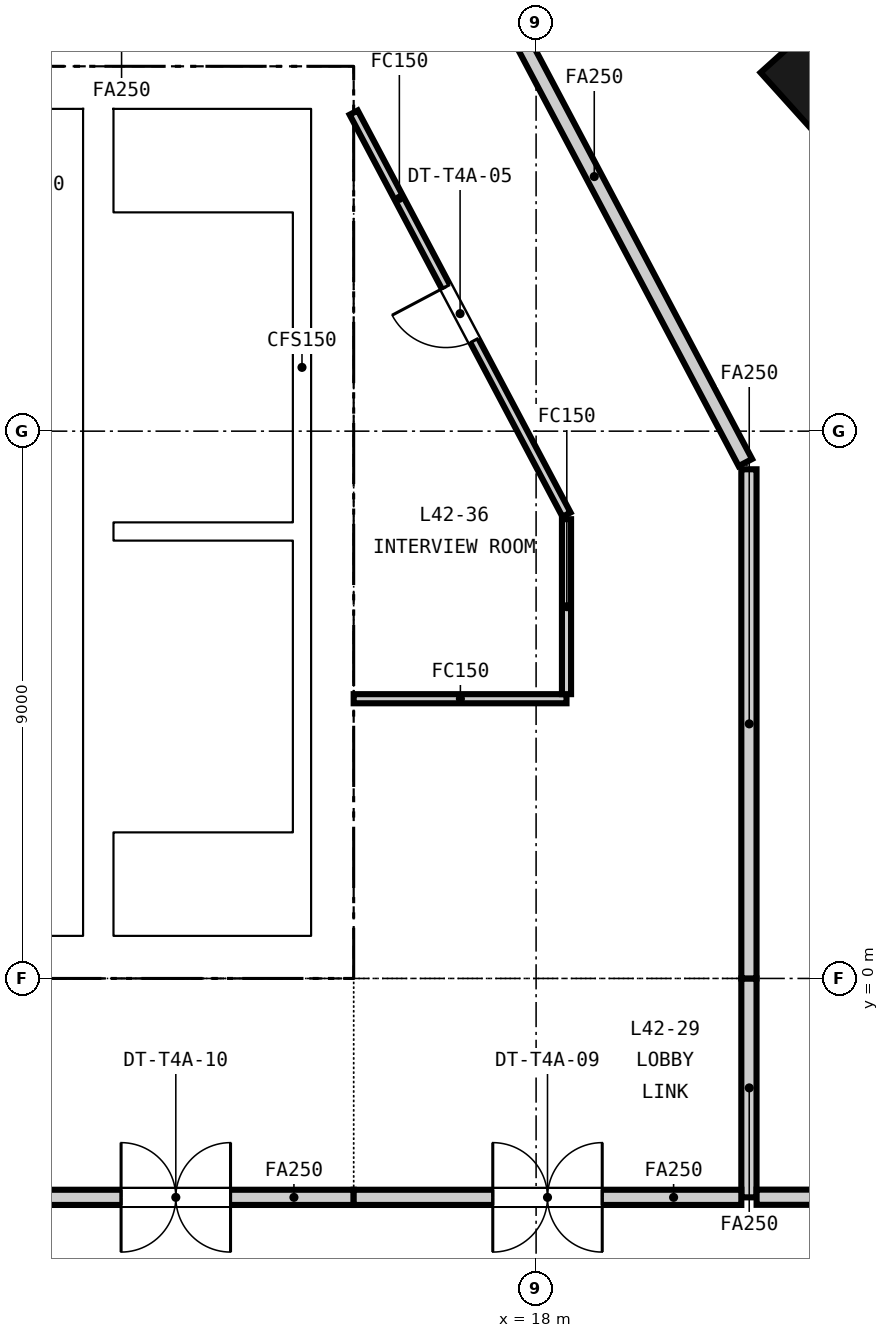
"""IFC4 building model, lengths in metres.
Left out: names, types, materials, properties, quantities, classifications, styles, units other than length and angle.
Written with IfcOpenShell. Run it as: python <this file> out.ifc"""

import sys

from ifc_helpers import new_model, si_unit, direction, frame, frame_2d, origin, origin_2d, place, context, subcontext, project, spatial, rectangle, extrude, element, fill, save


model = new_model("IFC4")
c1 = context("Model", 3, precision=1e-05, world=origin(), true_north=direction((0.0, 1.0)))
c2 = subcontext(c1, "Body", "Model", "MODEL_VIEW")
j1 = project(units=[si_unit("LENGTHUNIT", "METRE"), si_unit("PLANEANGLEUNIT", "RADIAN")], contexts=[c1])
p1 = place(None, origin())
s1 = spatial("IfcSite", under=j1, at=p1, CompositionType="ELEMENT")
p2 = place(p1, origin())
s2 = spatial("IfcBuilding", under=s1, at=p2, CompositionType="ELEMENT")
p3 = place(p2, frame((0.0, 0.0, 170.8)))
s3 = spatial("IfcBuildingStorey", under=s2, at=p3, CompositionType="ELEMENT", Elevation=170.8)
p4 = place(p3, frame((-15.0, 0.35, -0.15), z_axis=(0.0, 0.0, 1.0), x_axis=(1.0, 0.0, 0.0)))
e1 = element("IfcWall", 1, at=p4, inside=s3, PredefinedType="SOLIDWALL", context=c2, shape_type="SweptSolid", body=[
    extrude(rectangle(XDim=30.0, YDim=0.7, at=frame_2d((15.0, 0.0))), origin(), (0.0, 0.0, 1.0), 3.65),
])
p5 = place(p4, frame((5.8, 0.0, 0.15)))
e2 = element("IfcOpeningElement", 2, at=p5, cuts=e1, PredefinedType="OPENING", context=c2, shape_type="SweptSolid", body=[
    extrude(rectangle(XDim=2.4, YDim=2.4, at=frame_2d((1.2, 1.2))), frame((0.0, 0.36, 0.0), z_axis=(0.0, -1.0, 0.0), x_axis=(1.0, 0.0, 0.0)), (0.0, 0.0, 1.0), 0.72),
])
p6 = place(p4, frame((13.8, 0.0, 0.15)))
e3 = element("IfcOpeningElement", 3, at=p6, cuts=e1, PredefinedType="OPENING", context=c2, shape_type="SweptSolid", body=[
    extrude(rectangle(XDim=2.4, YDim=2.4, at=frame_2d((1.2, 1.2))), frame((0.0, 0.36, 0.0), z_axis=(0.0, -1.0, 0.0), x_axis=(1.0, 0.0, 0.0)), (0.0, 0.0, 1.0), 0.72),
])
p7 = place(p4, frame((21.8, 0.0, 0.15)))
e4 = element("IfcOpeningElement", 4, at=p7, cuts=e1, PredefinedType="OPENING", context=c2, shape_type="SweptSolid", body=[
    extrude(rectangle(XDim=2.4, YDim=2.4, at=frame_2d((1.2, 1.2))), frame((0.0, 0.36, 0.0), z_axis=(0.0, -1.0, 0.0), x_axis=(1.0, 0.0, 0.0)), (0.0, 0.0, 1.0), 0.72),
])
p8 = place(p4, frame((1.5, 0.0, 0.15)))
e5 = element("IfcOpeningElement", 5, at=p8, cuts=e1, PredefinedType="OPENING", context=c2, shape_type="SweptSolid", body=[
    extrude(rectangle(XDim=1.2, YDim=2.1, at=frame_2d((0.6, 1.05))), frame((0.0, 0.36, 0.0), z_axis=(0.0, -1.0, 0.0), x_axis=(1.0, 0.0, 0.0)), (0.0, 0.0, 1.0), 0.72),
])
p9 = place(p4, frame((27.3, 0.0, 0.15)))
e6 = element("IfcOpeningElement", 6, at=p9, cuts=e1, PredefinedType="OPENING", context=c2, shape_type="SweptSolid", body=[
    extrude(rectangle(XDim=1.2, YDim=2.1, at=frame_2d((0.6, 1.05))), frame((0.0, 0.36, 0.0), z_axis=(0.0, -1.0, 0.0), x_axis=(1.0, 0.0, 0.0)), (0.0, 0.0, 1.0), 0.72),
])
p10 = place(p3, frame((-15.0, 14.65, -0.15), z_axis=(0.0, 0.0, 1.0), x_axis=(1.0, 0.0, 0.0)))
e7 = element("IfcWall", 7, at=p10, inside=s3, PredefinedType="SOLIDWALL", context=c2, shape_type="SweptSolid", body=[
    extrude(rectangle(XDim=30.0, YDim=0.7, at=frame_2d((15.0, 0.0))), origin(), (0.0, 0.0, 1.0), 3.65),
])
p11 = place(p10, frame((9.25, 0.0, 0.15)))
e8 = element("IfcOpeningElement", 8, at=p11, cuts=e7, PredefinedType="OPENING", context=c2, shape_type="SweptSolid", body=[
    extrude(rectangle(XDim=1.5, YDim=2.1, at=frame_2d((0.75, 1.05))), frame((0.0, 0.36, 0.0), z_axis=(0.0, -1.0, 0.0), x_axis=(1.0, 0.0, 0.0)), (0.0, 0.0, 1.0), 0.72),
])
p12 = place(p10, frame((19.4, 0.0, 0.15)))
e9 = element("IfcOpeningElement", 9, at=p12, cuts=e7, PredefinedType="OPENING", context=c2, shape_type="SweptSolid", body=[
    extrude(rectangle(XDim=1.5, YDim=2.1, at=frame_2d((0.75, 1.05))), frame((0.0, 0.36, 0.0), z_axis=(0.0, -1.0, 0.0), x_axis=(1.0, 0.0, 0.0)), (0.0, 0.0, 1.0), 0.72),
])
p13 = place(p10, frame((1.5, 0.0, 0.15)))
e10 = element("IfcOpeningElement", 10, at=p13, cuts=e7, PredefinedType="OPENING", context=c2, shape_type="SweptSolid", body=[
    extrude(rectangle(XDim=1.2, YDim=2.1, at=frame_2d((0.6, 1.05))), frame((0.0, 0.36, 0.0), z_axis=(0.0, -1.0, 0.0), x_axis=(1.0, 0.0, 0.0)), (0.0, 0.0, 1.0), 0.72),
])
p14 = place(p10, frame((27.3, 0.0, 0.15)))
e11 = element("IfcOpeningElement", 11, at=p14, cuts=e7, PredefinedType="OPENING", context=c2, shape_type="SweptSolid", body=[
    extrude(rectangle(XDim=1.2, YDim=2.1, at=frame_2d((0.6, 1.05))), frame((0.0, 0.36, 0.0), z_axis=(0.0, -1.0, 0.0), x_axis=(1.0, 0.0, 0.0)), (0.0, 0.0, 1.0), 0.72),
])
p15 = place(p3, frame((14.65, 0.7, -0.15), z_axis=(0.0, 0.0, 1.0), x_axis=(0.0, 1.0, 0.0)))
e12 = element("IfcWall", 12, at=p15, inside=s3, PredefinedType="SOLIDWALL", context=c2, shape_type="SweptSolid", body=[
    extrude(rectangle(XDim=13.6, YDim=0.7, at=frame_2d((6.8, 0.0))), origin(), (0.0, 0.0, 1.0), 3.65),
])
p16 = place(p3, frame((10.8, 0.7, -0.15), z_axis=(0.0, 0.0, 1.0), x_axis=(0.0, 1.0, 0.0)))
e13 = element("IfcWall", 13, at=p16, inside=s3, PredefinedType="SOLIDWALL", context=c2, shape_type="SweptSolid", body=[
    extrude(rectangle(XDim=13.6, YDim=0.5, at=frame_2d((6.8, 0.0))), origin(), (0.0, 0.0, 1.0), 3.65),
])
p17 = place(p3, frame((22.61, 14.849, -0.15), z_axis=(0.0, 0.0, 1.0), x_axis=(-0.669130606359, 0.743144825477, 0.0)))
e14 = element("IfcColumn", 14, at=p17, inside=s3, PredefinedType="COLUMN", context=c2, shape_type="SweptSolid", body=[
    extrude(rectangle(XDim=1.3, YDim=1.3, at=origin_2d()), origin(), (0.0, 0.0, 1.0), 3.65),
])
p18 = place(p3, frame((-10.55, 3.5, 0.0), z_axis=(0.0, 0.0, 1.0), x_axis=(1.0, 0.0, 0.0)))
e15 = element("IfcWall", 15, at=p18, inside=s3, PredefinedType="PARTITIONING", context=c2, shape_type="SweptSolid", body=[
    extrude(rectangle(XDim=21.1, YDim=0.2, at=frame_2d((10.55, 0.0))), origin(), (0.0, 0.0, 1.0), 3.5),
])
p19 = place(p18, frame((1.262, 0.0, 0.0)))
e16 = element("IfcOpeningElement", 16, at=p19, cuts=e15, PredefinedType="OPENING", context=c2, shape_type="SweptSolid", body=[
    extrude(rectangle(XDim=1.0, YDim=2.1, at=frame_2d((0.5, 1.05))), frame((0.0, 0.11, 0.0), z_axis=(0.0, -1.0, 0.0), x_axis=(1.0, 0.0, 0.0)), (0.0, 0.0, 1.0), 0.22),
])
p20 = place(p18, frame((6.0, 0.0, 0.0)))
e17 = element("IfcOpeningElement", 17, at=p20, cuts=e15, PredefinedType="OPENING", context=c2, shape_type="SweptSolid", body=[
    extrude(rectangle(XDim=1.0, YDim=2.1, at=frame_2d((0.5, 1.05))), frame((0.0, 0.11, 0.0), z_axis=(0.0, -1.0, 0.0), x_axis=(1.0, 0.0, 0.0)), (0.0, 0.0, 1.0), 0.22),
])
p21 = place(p18, frame((11.1, 0.0, 0.0)))
e18 = element("IfcOpeningElement", 18, at=p21, cuts=e15, PredefinedType="OPENING", context=c2, shape_type="SweptSolid", body=[
    extrude(rectangle(XDim=1.0, YDim=2.1, at=frame_2d((0.5, 1.05))), frame((0.0, 0.11, 0.0), z_axis=(0.0, -1.0, 0.0), x_axis=(1.0, 0.0, 0.0)), (0.0, 0.0, 1.0), 0.22),
])
p22 = place(p18, frame((16.113, 0.0, 0.0)))
e19 = element("IfcOpeningElement", 19, at=p22, cuts=e15, PredefinedType="OPENING", context=c2, shape_type="SweptSolid", body=[
    extrude(rectangle(XDim=1.0, YDim=2.1, at=frame_2d((0.5, 1.05))), frame((0.0, 0.11, 0.0), z_axis=(0.0, -1.0, 0.0), x_axis=(1.0, 0.0, 0.0)), (0.0, 0.0, 1.0), 0.22),
])
p23 = place(p18, frame((19.9, 0.0, 0.0)))
e20 = element("IfcOpeningElement", 20, at=p23, cuts=e15, PredefinedType="OPENING", context=c2, shape_type="SweptSolid", body=[
    extrude(rectangle(XDim=0.9, YDim=2.1, at=frame_2d((0.45, 1.05))), frame((0.0, 0.11, 0.0), z_axis=(0.0, -1.0, 0.0), x_axis=(1.0, 0.0, 0.0)), (0.0, 0.0, 1.0), 0.22),
])
p24 = place(p3, frame((-10.55, 6.025, 0.0), z_axis=(0.0, 0.0, 1.0), x_axis=(1.0, 0.0, 0.0)))
e21 = element("IfcWall", 21, at=p24, inside=s3, PredefinedType="PARTITIONING", context=c2, shape_type="SweptSolid", body=[
    extrude(rectangle(XDim=21.1, YDim=0.25, at=frame_2d((10.55, 0.0))), origin(), (0.0, 0.0, 1.0), 3.5),
])
p25 = place(p3, frame((-10.55, 8.55, 0.0), z_axis=(0.0, 0.0, 1.0), x_axis=(1.0, 0.0, 0.0)))
e22 = element("IfcWall", 22, at=p25, inside=s3, PredefinedType="PARTITIONING", context=c2, shape_type="SweptSolid", body=[
    extrude(rectangle(XDim=21.1, YDim=0.2, at=frame_2d((10.55, 0.0))), origin(), (0.0, 0.0, 1.0), 3.5),
])
p26 = place(p25, frame((0.675, 0.0, 0.0)))
e23 = element("IfcOpeningElement", 23, at=p26, cuts=e22, PredefinedType="OPENING", context=c2, shape_type="SweptSolid", body=[
    extrude(rectangle(XDim=1.2, YDim=2.1, at=frame_2d((0.6, 1.05))), frame((0.0, 0.11, 0.0), z_axis=(0.0, -1.0, 0.0), x_axis=(1.0, 0.0, 0.0)), (0.0, 0.0, 1.0), 0.22),
])
p27 = place(p25, frame((3.475, 0.0, 0.0)))
e24 = element("IfcOpeningElement", 24, at=p27, cuts=e22, PredefinedType="OPENING", context=c2, shape_type="SweptSolid", body=[
    extrude(rectangle(XDim=1.2, YDim=2.1, at=frame_2d((0.6, 1.05))), frame((0.0, 0.11, 0.0), z_axis=(0.0, -1.0, 0.0), x_axis=(1.0, 0.0, 0.0)), (0.0, 0.0, 1.0), 0.22),
])
p28 = place(p25, frame((6.275, 0.0, 0.0)))
e25 = element("IfcOpeningElement", 25, at=p28, cuts=e22, PredefinedType="OPENING", context=c2, shape_type="SweptSolid", body=[
    extrude(rectangle(XDim=1.2, YDim=2.1, at=frame_2d((0.6, 1.05))), frame((0.0, 0.11, 0.0), z_axis=(0.0, -1.0, 0.0), x_axis=(1.0, 0.0, 0.0)), (0.0, 0.0, 1.0), 0.22),
])
p29 = place(p25, frame((9.075, 0.0, 0.0)))
e26 = element("IfcOpeningElement", 26, at=p29, cuts=e22, PredefinedType="OPENING", context=c2, shape_type="SweptSolid", body=[
    extrude(rectangle(XDim=1.2, YDim=2.1, at=frame_2d((0.6, 1.05))), frame((0.0, 0.11, 0.0), z_axis=(0.0, -1.0, 0.0), x_axis=(1.0, 0.0, 0.0)), (0.0, 0.0, 1.0), 0.22),
])
p30 = place(p25, frame((11.875, 0.0, 0.0)))
e27 = element("IfcOpeningElement", 27, at=p30, cuts=e22, PredefinedType="OPENING", context=c2, shape_type="SweptSolid", body=[
    extrude(rectangle(XDim=1.2, YDim=2.1, at=frame_2d((0.6, 1.05))), frame((0.0, 0.11, 0.0), z_axis=(0.0, -1.0, 0.0), x_axis=(1.0, 0.0, 0.0)), (0.0, 0.0, 1.0), 0.22),
])
p31 = place(p25, frame((14.675, 0.0, 0.0)))
e28 = element("IfcOpeningElement", 28, at=p31, cuts=e22, PredefinedType="OPENING", context=c2, shape_type="SweptSolid", body=[
    extrude(rectangle(XDim=1.2, YDim=2.1, at=frame_2d((0.6, 1.05))), frame((0.0, 0.11, 0.0), z_axis=(0.0, -1.0, 0.0), x_axis=(1.0, 0.0, 0.0)), (0.0, 0.0, 1.0), 0.22),
])
p32 = place(p25, frame((17.475, 0.0, 0.0)))
e29 = element("IfcOpeningElement", 29, at=p32, cuts=e22, PredefinedType="OPENING", context=c2, shape_type="SweptSolid", body=[
    extrude(rectangle(XDim=1.2, YDim=2.1, at=frame_2d((0.6, 1.05))), frame((0.0, 0.11, 0.0), z_axis=(0.0, -1.0, 0.0), x_axis=(1.0, 0.0, 0.0)), (0.0, 0.0, 1.0), 0.22),
])
p33 = place(p25, frame((19.9, 0.0, 0.0)))
e30 = element("IfcOpeningElement", 30, at=p33, cuts=e22, PredefinedType="OPENING", context=c2, shape_type="SweptSolid", body=[
    extrude(rectangle(XDim=0.9, YDim=2.1, at=frame_2d((0.45, 1.05))), frame((0.0, 0.11, 0.0), z_axis=(0.0, -1.0, 0.0), x_axis=(1.0, 0.0, 0.0)), (0.0, 0.0, 1.0), 0.22),
])
p34 = place(p3, frame((5.9, 11.2, 0.0), z_axis=(0.0, 0.0, 1.0), x_axis=(1.0, 0.0, 0.0)))
e31 = element("IfcWall", 31, at=p34, inside=s3, PredefinedType="PARTITIONING", context=c2, shape_type="SweptSolid", body=[
    extrude(rectangle(XDim=4.65, YDim=0.2, at=frame_2d((2.325, 0.0))), origin(), (0.0, 0.0, 1.0), 3.5),
])
p35 = place(p34, frame((3.4, 0.0, 0.0)))
e32 = element("IfcOpeningElement", 32, at=p35, cuts=e31, PredefinedType="OPENING", context=c2, shape_type="SweptSolid", body=[
    extrude(rectangle(XDim=0.9, YDim=2.1, at=frame_2d((0.45, 1.05))), frame((0.0, 0.11, 0.0), z_axis=(0.0, -1.0, 0.0), x_axis=(1.0, 0.0, 0.0)), (0.0, 0.0, 1.0), 0.22),
])
p36 = place(p3, frame((11.05, 7.35, 0.0), z_axis=(0.0, 0.0, 1.0), x_axis=(1.0, 0.0, 0.0)))
e33 = element("IfcWall", 33, at=p36, inside=s3, PredefinedType="SOLIDWALL", context=c2, shape_type="SweptSolid", body=[
    extrude(rectangle(XDim=2.95, YDim=0.3, at=frame_2d((1.475, 0.0))), origin(), (0.0, 0.0, 1.0), 3.5),
])
p37 = place(p3, frame((14.15, 0.7, 0.0), z_axis=(0.0, 0.0, 1.0), x_axis=(0.0, 1.0, 0.0)))
e34 = element("IfcWall", 34, at=p37, inside=s3, PredefinedType="SOLIDWALL", context=c2, shape_type="SweptSolid", body=[
    extrude(rectangle(XDim=13.6, YDim=0.3, at=frame_2d((6.8, 0.0))), origin(), (0.0, 0.0, 1.0), 3.5),
])
p38 = place(p3, frame((15.0, -3.6, 0.0), z_axis=(0.0, 0.0, 1.0), x_axis=(-1.0, 0.0, 0.0)))
e35 = element("IfcWall", 35, at=p38, inside=s3, PredefinedType="PARTITIONING", context=c2, shape_type="SweptSolid", body=[
    extrude(rectangle(XDim=5.85, YDim=0.25, at=frame_2d((2.925, 0.0))), origin(), (0.0, 0.0, 1.0), 2.741),
])
p39 = place(p38, frame((2.025, 0.0, 0.0)))
e36 = element("IfcOpeningElement", 36, at=p39, cuts=e35, PredefinedType="OPENING", context=c2, shape_type="SweptSolid", body=[
    extrude(rectangle(XDim=1.8, YDim=2.1, at=frame_2d((0.9, 1.05))), frame((0.0, 0.135, 0.0), z_axis=(0.0, -1.0, 0.0), x_axis=(1.0, 0.0, 0.0)), (0.0, 0.0, 1.0), 0.27),
])
p40 = place(p3, frame((21.5, 0.0, 0.0), z_axis=(0.0, 0.0, 1.0), x_axis=(0.0, -1.0, 0.0)))
e37 = element("IfcWall", 37, at=p40, inside=s3, PredefinedType="PARTITIONING", context=c2, shape_type="SweptSolid", body=[
    extrude(rectangle(XDim=3.6, YDim=0.25, at=frame_2d((1.8, 0.0))), origin(), (0.0, 0.0, 1.0), 2.741),
])
p41 = place(p3, frame((21.375, -3.6, 0.0), z_axis=(0.0, 0.0, 1.0), x_axis=(-1.0, 0.0, 0.0)))
e38 = element("IfcWall", 38, at=p41, inside=s3, PredefinedType="PARTITIONING", context=c2, shape_type="SweptSolid", body=[
    extrude(rectangle(XDim=6.375, YDim=0.25, at=frame_2d((3.188, 0.0))), origin(), (0.0, 0.0, 1.0), 2.741),
])
p42 = place(p41, frame((2.288, 0.0, 0.0)))
e39 = element("IfcOpeningElement", 39, at=p42, cuts=e38, PredefinedType="OPENING", context=c2, shape_type="SweptSolid", body=[
    extrude(rectangle(XDim=1.8, YDim=2.1, at=frame_2d((0.9, 1.05))), frame((0.0, 0.135, 0.0), z_axis=(0.0, -1.0, 0.0), x_axis=(1.0, 0.0, 0.0)), (0.0, 0.0, 1.0), 0.27),
])
p43 = place(p3, frame((18.5, 7.627, 0.0), z_axis=(0.0, 0.0, 1.0), x_axis=(-0.467835241243, 0.883815697446, 0.0)))
e40 = element("IfcWall", 40, at=p43, inside=s3, PredefinedType="PARTITIONING", context=c2, shape_type="SweptSolid", body=[
    extrude(rectangle(XDim=7.481, YDim=0.15, at=frame_2d((3.741, 0.0))), origin(), (0.0, 0.0, 1.0), 2.741),
])
p44 = place(p43, frame((3.24, 0.0, 0.0)))
e41 = element("IfcOpeningElement", 41, at=p44, cuts=e40, PredefinedType="OPENING", context=c2, shape_type="SweptSolid", body=[
    extrude(rectangle(XDim=1.0, YDim=2.1, at=frame_2d((0.5, 1.05))), frame((0.0, 0.085, 0.0), z_axis=(0.0, -1.0, 0.0), x_axis=(1.0, 0.0, 0.0)), (0.0, 0.0, 1.0), 0.17),
])
p45 = place(p3, frame((21.5, 8.373, 0.0), z_axis=(0.0, 0.0, 1.0), x_axis=(0.0, -1.0, 0.0)))
e42 = element("IfcWall", 42, at=p45, inside=s3, PredefinedType="PARTITIONING", context=c2, shape_type="SweptSolid", body=[
    extrude(rectangle(XDim=8.373, YDim=0.25, at=frame_2d((4.187, 0.0))), origin(), (0.0, 0.0, 1.0), 2.741),
])
p46 = place(p3, frame((15.0, 4.6, 0.0), z_axis=(0.0, 0.0, 1.0), x_axis=(1.0, 0.0, 0.0)))
e43 = element("IfcWall", 43, at=p46, inside=s3, PredefinedType="PARTITIONING", context=c2, shape_type="SweptSolid", body=[
    extrude(rectangle(XDim=3.5, YDim=0.15, at=frame_2d((1.75, 0.0))), origin(), (0.0, 0.0, 1.0), 2.741),
])
p47 = place(p3, frame((18.5, 4.675, 0.0), z_axis=(0.0, 0.0, 1.0), x_axis=(0.0, 1.0, 0.0)))
e44 = element("IfcWall", 44, at=p47, inside=s3, PredefinedType="PARTITIONING", context=c2, shape_type="SweptSolid", body=[
    extrude(rectangle(XDim=2.877, YDim=0.15, at=frame_2d((1.438, 0.0))), origin(), (0.0, 0.0, 1.0), 2.741),
])
p48 = place(p3, frame((16.461, 17.889, 0.0), z_axis=(0.0, 0.0, 1.0), x_axis=(0.467911961302, -0.883775082513, 0.0)))
e45 = element("IfcWall", 45, at=p48, inside=s3, PredefinedType="PARTITIONING", context=c2, shape_type="SweptSolid", body=[
    extrude(rectangle(XDim=10.643, YDim=0.25, at=frame_2d((5.322, 0.0))), origin(), (0.0, 0.0, 1.0), 2.741),
])
p49 = place(p3, frame((21.626, -3.598, 0.0), z_axis=(0.0, 0.0, 1.0), x_axis=(1.0, 0.0, 0.0)))
e46 = element("IfcWall", 46, at=p49, inside=s3, PredefinedType="PARTITIONING", context=c2, shape_type="SweptSolid", body=[
    extrude(rectangle(XDim=7.725, YDim=0.25, at=frame_2d((3.863, 0.0))), origin(), (0.0, 0.0, 1.0), 2.741),
])
p50 = place(p23, origin())
e47 = element("IfcDoor", 47, at=p50, inside=s3, OperationType="SINGLE_SWING_RIGHT", PredefinedType="DOOR", context=c2, shape_type="SweptSolid", body=[
    extrude(rectangle(XDim=0.9, YDim=2.1, at=frame_2d((0.45, 1.05))), frame((0.0, 0.025, 0.0), z_axis=(0.0, -1.0, 0.0), x_axis=(1.0, 0.0, 0.0)), (0.0, 0.0, 1.0), 0.05),
])
fill(e20, e47)
p51 = place(p33, origin())
e48 = element("IfcDoor", 48, at=p51, inside=s3, OperationType="SINGLE_SWING_RIGHT", PredefinedType="DOOR", context=c2, shape_type="SweptSolid", body=[
    extrude(rectangle(XDim=0.9, YDim=2.1, at=frame_2d((0.45, 1.05))), frame((0.0, 0.025, 0.0), z_axis=(0.0, -1.0, 0.0), x_axis=(1.0, 0.0, 0.0)), (0.0, 0.0, 1.0), 0.05),
])
fill(e30, e48)
p52 = place(p35, origin())
e49 = element("IfcDoor", 49, at=p52, inside=s3, OperationType="SINGLE_SWING_LEFT", PredefinedType="DOOR", context=c2, shape_type="SweptSolid", body=[
    extrude(rectangle(XDim=0.9, YDim=2.1, at=frame_2d((0.45, 1.05))), frame((0.0, 0.025, 0.0), z_axis=(0.0, -1.0, 0.0), x_axis=(1.0, 0.0, 0.0)), (0.0, 0.0, 1.0), 0.05),
])
fill(e32, e49)
p53 = place(p14, origin())
e50 = element("IfcDoor", 50, at=p53, inside=s3, OperationType="SINGLE_SWING_LEFT", PredefinedType="DOOR", context=c2, shape_type="SweptSolid", body=[
    extrude(rectangle(XDim=1.2, YDim=2.1, at=frame_2d((0.6, 1.05))), frame((0.0, 0.025, 0.0), z_axis=(0.0, -1.0, 0.0), x_axis=(1.0, 0.0, 0.0)), (0.0, 0.0, 1.0), 0.05),
])
fill(e11, e50)
p54 = place(p9, origin())
e51 = element("IfcDoor", 51, at=p54, inside=s3, OperationType="SINGLE_SWING_RIGHT", PredefinedType="DOOR", context=c2, shape_type="SweptSolid", body=[
    extrude(rectangle(XDim=1.2, YDim=2.1, at=frame_2d((0.6, 1.05))), frame((0.0, 0.025, 0.0), z_axis=(0.0, -1.0, 0.0), x_axis=(1.0, 0.0, 0.0)), (0.0, 0.0, 1.0), 0.05),
])
fill(e6, e51)
p55 = place(p44, origin())
e52 = element("IfcDoor", 52, at=p55, inside=s3, OperationType="SINGLE_SWING_RIGHT", PredefinedType="DOOR", context=c2, shape_type="SweptSolid", body=[
    extrude(rectangle(XDim=1.0, YDim=2.1, at=frame_2d((0.5, 1.05))), frame((0.0, 0.025, 0.0), z_axis=(0.0, -1.0, 0.0), x_axis=(1.0, 0.0, 0.0)), (0.0, 0.0, 1.0), 0.05),
])
fill(e41, e52)
p56 = place(p42, origin())
e53 = element("IfcDoor", 53, at=p56, inside=s3, OperationType="DOUBLE_DOOR_DOUBLE_SWING", PredefinedType="DOOR", context=c2, shape_type="SweptSolid", body=[
    extrude(rectangle(XDim=1.8, YDim=2.1, at=frame_2d((0.9, 1.05))), frame((0.0, 0.025, 0.0), z_axis=(0.0, -1.0, 0.0), x_axis=(1.0, 0.0, 0.0)), (0.0, 0.0, 1.0), 0.05),
])
fill(e39, e53)
p57 = place(p39, origin())
e54 = element("IfcDoor", 54, at=p57, inside=s3, OperationType="DOUBLE_DOOR_DOUBLE_SWING", PredefinedType="DOOR", context=c2, shape_type="SweptSolid", body=[
    extrude(rectangle(XDim=1.8, YDim=2.1, at=frame_2d((0.9, 1.05))), frame((0.0, 0.025, 0.0), z_axis=(0.0, -1.0, 0.0), x_axis=(1.0, 0.0, 0.0)), (0.0, 0.0, 1.0), 0.05),
])
fill(e36, e54)
save(model, sys.argv[1])
